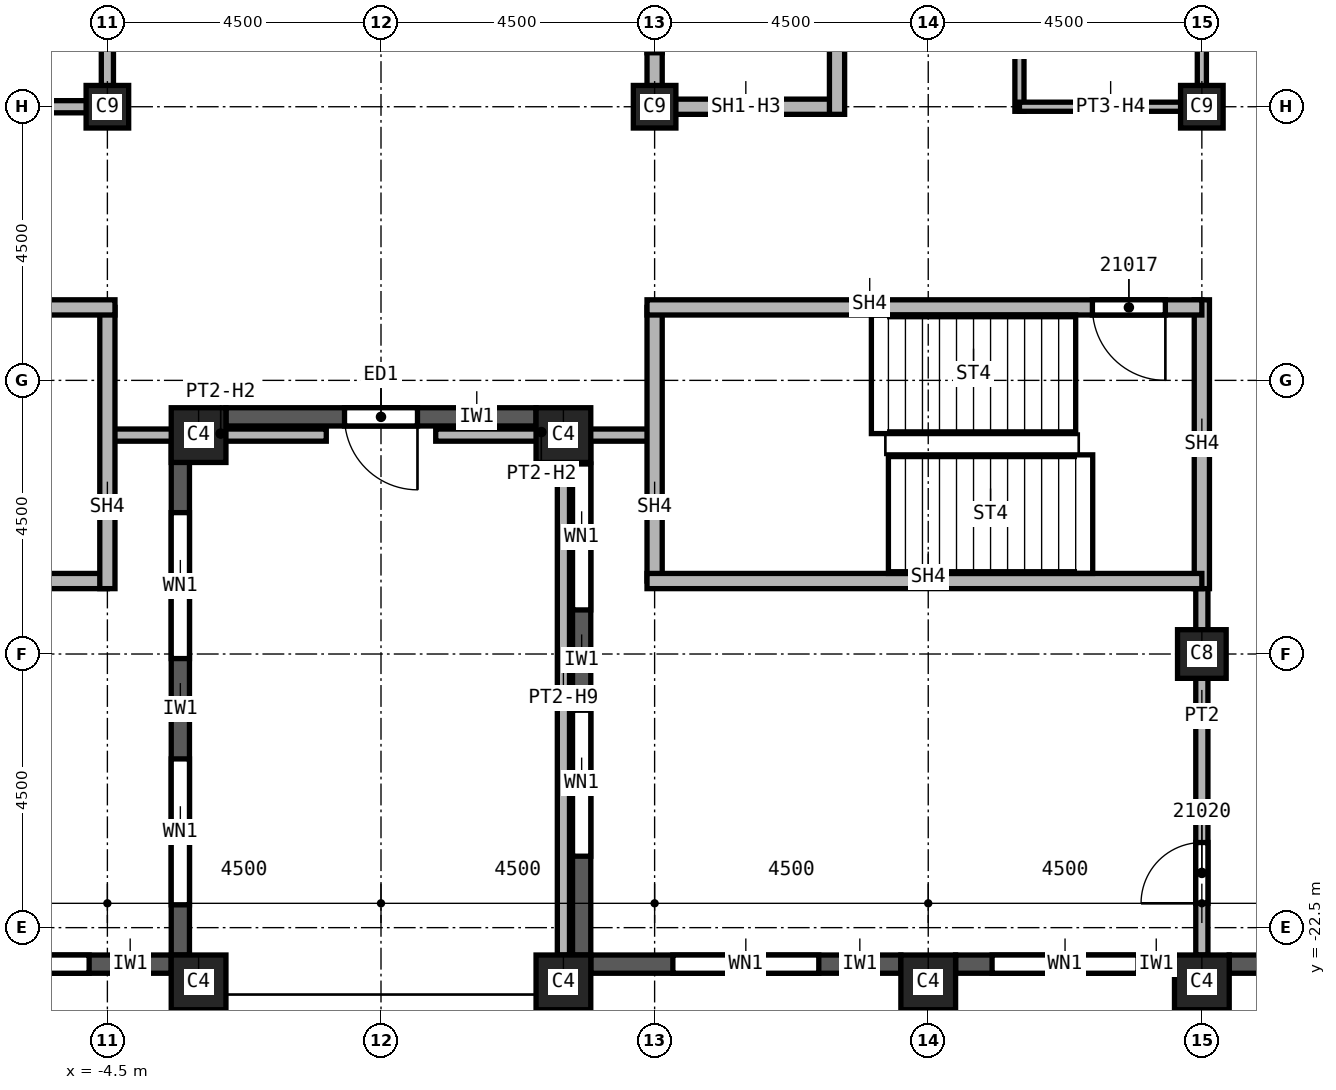
"""IFC4 building model, lengths in metres.
Left out: names, types, materials, properties, quantities, classifications, styles, units other than length and angle.
Written with IfcOpenShell. Run it as: python <this file> out.ifc"""

import sys

from ifc_helpers import new_model, si_unit, direction, frame, frame_2d, origin, origin_2d, place, context, subcontext, project, spatial, rectangle, extrude, element, fill, save


model = new_model("IFC4")
c1 = context("Model", 3, precision=1e-05, world=origin(), true_north=direction((0.0, 1.0)))
c2 = subcontext(c1, "Body", "Model", "MODEL_VIEW")
j1 = project(units=[si_unit("LENGTHUNIT", "METRE"), si_unit("PLANEANGLEUNIT", "RADIAN")], contexts=[c1])
p1 = place(None, origin())
s1 = spatial("IfcSite", under=j1, at=p1, CompositionType="ELEMENT")
p2 = place(p1, origin())
s2 = spatial("IfcBuilding", under=s1, at=p2, CompositionType="ELEMENT")
p3 = place(p2, frame((0.0, 0.0, 300.0)))
s3 = spatial("IfcBuildingStorey", under=s2, at=p3, CompositionType="ELEMENT", Elevation=300.0)
p4 = place(p3, frame((13.5, -18.0, 0.0), z_axis=(0.0, 0.0, 1.0), x_axis=(1.0, 0.0, 0.0)))
e1 = element("IfcColumn", 1, at=p4, inside=s3, PredefinedType="COLUMN", context=c2, shape_type="SweptSolid", body=[
    extrude(rectangle(XDim=0.8, YDim=0.8, at=origin_2d()), origin(), (0.0, 0.0, 1.0), 3.74),
])
for number, where, z_axis, x_axis in (
    (2, (4.5, -9.0, 0.0), (0.0, 0.0, 1.0), (1.0, 0.0, 0.0)),
    (3, (13.5, -9.0, 0.0), (0.0, 0.0, 1.0), (1.0, 0.0, 0.0)),
    (4, (-4.5, -9.0, 0.0), (0.0, 0.0, 1.0), (1.0, 0.0, 0.0)),
):
    element("IfcColumn", number, at=place(p3, frame(where, z_axis=z_axis, x_axis=x_axis)), inside=s3, PredefinedType="COLUMN", context=c2, shape_type="SweptSolid", body=[
        extrude(rectangle(XDim=0.7, YDim=0.7, at=origin_2d()), origin(), (0.0, 0.0, 1.0), 3.74),
    ])
for number, where, z_axis, x_axis in (
    (5, (3.0, -23.4, 0.0), (0.0, 0.0, 1.0), (1.0, 0.0, 0.0)),
    (6, (9.0, -23.4, 0.0), (0.0, 0.0, 1.0), (1.0, 0.0, 0.0)),
    (7, (13.5, -23.4, 0.0), (0.0, 0.0, 1.0), (1.0, 0.0, 0.0)),
    (8, (-3.0, -23.4, 0.0), (0.0, 0.0, 1.0), (1.0, 0.0, 0.0)),
    (9, (3.0, -14.4, 0.0), (0.0, 0.0, 1.0), (1.0, 0.0, 0.0)),
    (10, (-3.0, -14.4, 0.0), (0.0, 0.0, 1.0), (1.0, 0.0, 0.0)),
):
    element("IfcColumn", number, at=place(p3, frame(where, z_axis=z_axis, x_axis=x_axis)), inside=s3, PredefinedType="COLUMN", context=c2, shape_type="SweptSolid", body=[
        extrude(rectangle(XDim=0.9, YDim=0.9, at=origin_2d()), origin(), (0.0, 0.0, 1.0), 3.74),
    ])
p5 = place(p3, frame((-8.55, -23.1, 0.0), z_axis=(0.0, 0.0, 1.0), x_axis=(1.0, 0.0, 0.0)))
e11 = element("IfcWall", 11, at=p5, inside=s3, PredefinedType="SOLIDWALL", context=c2, shape_type="SweptSolid", body=[
    extrude(rectangle(XDim=5.1, YDim=0.3, at=frame_2d((2.55, 0.0))), origin(), (0.0, 0.0, 1.0), 3.14),
])
p6 = place(p5, frame((1.35, 0.0, 0.8)))
e12 = element("IfcOpeningElement", 12, at=p6, cuts=e11, PredefinedType="OPENING", context=c2, shape_type="SweptSolid", body=[
    extrude(rectangle(XDim=2.4, YDim=1.95, at=frame_2d((1.2, 0.975))), frame((0.0, 0.15, 0.0), z_axis=(0.0, -1.0, 0.0), x_axis=(1.0, 0.0, 0.0)), (0.0, 0.0, 1.0), 0.3),
])
p7 = place(p3, frame((-3.3, -22.95, 0.0), z_axis=(0.0, 0.0, 1.0), x_axis=(0.0, 1.0, 0.0)))
e13 = element("IfcWall", 13, at=p7, inside=s3, PredefinedType="SOLIDWALL", context=c2, shape_type="SweptSolid", body=[
    extrude(rectangle(XDim=8.5, YDim=0.3, at=frame_2d((4.25, 0.0))), origin(), (0.0, 0.0, 1.0), 3.14),
])
p8 = place(p7, frame((0.825, 0.0, 0.8)))
e14 = element("IfcOpeningElement", 14, at=p8, cuts=e13, PredefinedType="OPENING", context=c2, shape_type="SweptSolid", body=[
    extrude(rectangle(XDim=2.4, YDim=1.95, at=frame_2d((1.2, 0.975))), frame((0.0, 0.15, 0.0), z_axis=(0.0, -1.0, 0.0), x_axis=(1.0, 0.0, 0.0)), (0.0, 0.0, 1.0), 0.3),
])
p9 = place(p7, frame((4.875, 0.0, 0.8)))
e15 = element("IfcOpeningElement", 15, at=p9, cuts=e13, PredefinedType="OPENING", context=c2, shape_type="SweptSolid", body=[
    extrude(rectangle(XDim=2.4, YDim=1.95, at=frame_2d((1.2, 0.975))), frame((0.0, 0.15, 0.0), z_axis=(0.0, -1.0, 0.0), x_axis=(1.0, 0.0, 0.0)), (0.0, 0.0, 1.0), 0.3),
])
p10 = place(p3, frame((2.55, -14.1, 0.0), z_axis=(0.0, 0.0, 1.0), x_axis=(-1.0, 0.0, 0.0)))
e16 = element("IfcWall", 16, at=p10, inside=s3, PredefinedType="SOLIDWALL", context=c2, shape_type="SweptSolid", body=[
    extrude(rectangle(XDim=5.1, YDim=0.3, at=frame_2d((2.55, 0.0))), origin(), (0.0, 0.0, 1.0), 3.14),
])
p11 = place(p10, frame((1.95, 0.0, 0.0)))
e17 = element("IfcOpeningElement", 17, at=p11, cuts=e16, PredefinedType="OPENING", context=c2, shape_type="SweptSolid", body=[
    extrude(rectangle(XDim=1.2, YDim=2.4, at=frame_2d((0.6, 1.2))), frame((0.0, 0.15, 0.0), z_axis=(0.0, -1.0, 0.0), x_axis=(1.0, 0.0, 0.0)), (0.0, 0.0, 1.0), 0.3),
])
p12 = place(p3, frame((3.3, -14.45, 0.0), z_axis=(0.0, 0.0, 1.0), x_axis=(0.0, -1.0, 0.0)))
e18 = element("IfcWall", 18, at=p12, inside=s3, PredefinedType="SOLIDWALL", context=c2, shape_type="SweptSolid", body=[
    extrude(rectangle(XDim=8.5, YDim=0.3, at=frame_2d((4.25, 0.0))), origin(), (0.0, 0.0, 1.0), 3.14),
])
p13 = place(p12, frame((0.425, 0.0, 0.8)))
e19 = element("IfcOpeningElement", 19, at=p13, cuts=e18, PredefinedType="OPENING", context=c2, shape_type="SweptSolid", body=[
    extrude(rectangle(XDim=2.4, YDim=1.95, at=frame_2d((1.2, 0.975))), frame((0.0, 0.15, 0.0), z_axis=(0.0, -1.0, 0.0), x_axis=(1.0, 0.0, 0.0)), (0.0, 0.0, 1.0), 0.3),
])
p14 = place(p12, frame((4.475, 0.0, 0.8)))
e20 = element("IfcOpeningElement", 20, at=p14, cuts=e18, PredefinedType="OPENING", context=c2, shape_type="SweptSolid", body=[
    extrude(rectangle(XDim=2.4, YDim=1.95, at=frame_2d((1.2, 0.975))), frame((0.0, 0.15, 0.0), z_axis=(0.0, -1.0, 0.0), x_axis=(1.0, 0.0, 0.0)), (0.0, 0.0, 1.0), 0.3),
])
p15 = place(p3, frame((3.45, -23.1, 0.0), z_axis=(0.0, 0.0, 1.0), x_axis=(1.0, 0.0, 0.0)))
e21 = element("IfcWall", 21, at=p15, inside=s3, PredefinedType="SOLIDWALL", context=c2, shape_type="SweptSolid", body=[
    extrude(rectangle(XDim=5.1, YDim=0.3, at=frame_2d((2.55, 0.0))), origin(), (0.0, 0.0, 1.0), 3.14),
])
p16 = place(p15, frame((1.35, 0.0, 0.8)))
e22 = element("IfcOpeningElement", 22, at=p16, cuts=e21, PredefinedType="OPENING", context=c2, shape_type="SweptSolid", body=[
    extrude(rectangle(XDim=2.4, YDim=1.95, at=frame_2d((1.2, 0.975))), frame((0.0, 0.15, 0.0), z_axis=(0.0, -1.0, 0.0), x_axis=(1.0, 0.0, 0.0)), (0.0, 0.0, 1.0), 0.3),
])
p17 = place(p3, frame((9.45, -23.1, 0.0), z_axis=(0.0, 0.0, 1.0), x_axis=(1.0, 0.0, 0.0)))
e23 = element("IfcWall", 23, at=p17, inside=s3, PredefinedType="SOLIDWALL", context=c2, shape_type="SweptSolid", body=[
    extrude(rectangle(XDim=3.6, YDim=0.3, at=frame_2d((1.8, 0.0))), origin(), (0.0, 0.0, 1.0), 3.14),
])
p18 = place(p17, frame((0.6, 0.0, 0.8)))
e24 = element("IfcOpeningElement", 24, at=p18, cuts=e23, PredefinedType="OPENING", context=c2, shape_type="SweptSolid", body=[
    extrude(rectangle(XDim=2.4, YDim=1.95, at=frame_2d((1.2, 0.975))), frame((0.0, 0.15, 0.0), z_axis=(0.0, -1.0, 0.0), x_axis=(1.0, 0.0, 0.0)), (0.0, 0.0, 1.0), 0.3),
])
p19 = place(p3, frame((13.95, -23.1, 0.0), z_axis=(0.0, 0.0, 1.0), x_axis=(1.0, 0.0, 0.0)))
e25 = element("IfcWall", 25, at=p19, inside=s3, PredefinedType="SOLIDWALL", context=c2, shape_type="SweptSolid", body=[
    extrude(rectangle(XDim=3.6, YDim=0.3, at=frame_2d((1.8, 0.0))), origin(), (0.0, 0.0, 1.0), 3.14),
])
p20 = place(p19, frame((0.625, 0.0, 0.8)))
e26 = element("IfcOpeningElement", 26, at=p20, cuts=e25, PredefinedType="OPENING", context=c2, shape_type="SweptSolid", body=[
    extrude(rectangle(XDim=0.6, YDim=1.95, at=frame_2d((0.3, 0.975))), frame((0.0, 0.15, 0.0), z_axis=(0.0, -1.0, 0.0), x_axis=(1.0, 0.0, 0.0)), (0.0, 0.0, 1.0), 0.3),
])
p21 = place(p19, frame((1.825, 0.0, 0.8)))
e27 = element("IfcOpeningElement", 27, at=p21, cuts=e25, PredefinedType="OPENING", context=c2, shape_type="SweptSolid", body=[
    extrude(rectangle(XDim=1.0, YDim=1.95, at=frame_2d((0.5, 0.975))), frame((0.0, 0.15, 0.0), z_axis=(0.0, -1.0, 0.0), x_axis=(1.0, 0.0, 0.0)), (0.0, 0.0, 1.0), 0.3),
])
p22 = place(p3, frame((-0.9, -14.4, 0.0), z_axis=(0.0, 0.0, 1.0), x_axis=(-1.0, 0.0, 0.0)))
e28 = element("IfcWall", 28, at=p22, inside=s3, PredefinedType="PARTITIONING", context=c2, shape_type="SweptSolid", body=[
    extrude(rectangle(XDim=3.6, YDim=0.2, at=frame_2d((1.8, 0.0))), origin(), (0.0, 0.0, 1.0), 3.207),
])
p23 = place(p3, frame((3.0, -14.4, 0.0), z_axis=(0.0, 0.0, 1.0), x_axis=(0.0, -1.0, 0.0)))
e29 = element("IfcWall", 29, at=p23, inside=s3, PredefinedType="PARTITIONING", context=c2, shape_type="SweptSolid", body=[
    extrude(rectangle(XDim=8.55, YDim=0.2, at=frame_2d((4.275, 0.0))), origin(), (0.0, 0.0, 1.0), 2.894),
])
p24 = place(p3, frame((4.5, -14.4, 0.0), z_axis=(0.0, 0.0, 1.0), x_axis=(-1.0, 0.0, 0.0)))
e30 = element("IfcWall", 30, at=p24, inside=s3, PredefinedType="PARTITIONING", context=c2, shape_type="SweptSolid", body=[
    extrude(rectangle(XDim=3.6, YDim=0.2, at=frame_2d((1.8, 0.0))), origin(), (0.0, 0.0, 1.0), 3.207),
])
p25 = place(p3, frame((13.5, -22.95, 0.0), z_axis=(0.0, 0.0, 1.0), x_axis=(0.0, 1.0, 0.0)))
e31 = element("IfcWall", 31, at=p25, inside=s3, PredefinedType="PARTITIONING", context=c2, shape_type="SweptSolid", body=[
    extrude(rectangle(XDim=6.275, YDim=0.2, at=frame_2d((3.137, 0.0))), origin(), (0.0, 0.0, 1.0), 3.74),
])
p26 = place(p25, frame((0.85, 0.0, 0.0)))
e32 = element("IfcOpeningElement", 32, at=p26, cuts=e31, PredefinedType="OPENING", context=c2, shape_type="SweptSolid", body=[
    extrude(rectangle(XDim=1.0, YDim=2.1, at=frame_2d((0.5, 1.05))), frame((0.0, 0.1, 0.0), z_axis=(0.0, -1.0, 0.0), x_axis=(1.0, 0.0, 0.0)), (0.0, 0.0, 1.0), 0.2),
])
p27 = place(p3, frame((-4.5, -9.0, 0.0), z_axis=(0.0, 0.0, 1.0), x_axis=(-1.0, 0.0, 0.0)))
e33 = element("IfcWall", 33, at=p27, inside=s3, PredefinedType="SOLIDWALL", context=c2, shape_type="SweptSolid", body=[
    extrude(rectangle(XDim=3.0, YDim=0.2, at=frame_2d((1.5, 0.0))), origin(), (0.0, 0.0, 1.0), 3.062),
])
p28 = place(p3, frame((-4.5, 6.0, 0.0), z_axis=(0.0, 0.0, 1.0), x_axis=(0.0, -1.0, 0.0)))
e34 = element("IfcWall", 34, at=p28, inside=s3, PredefinedType="SOLIDWALL", context=c2, shape_type="SweptSolid", body=[
    extrude(rectangle(XDim=15.1, YDim=0.2, at=frame_2d((7.55, 0.0))), origin(), (0.0, 0.0, 1.0), 3.062),
])
p29 = place(p28, frame((6.85, 0.0, 0.0)))
e35 = element("IfcOpeningElement", 35, at=p29, cuts=e34, PredefinedType="OPENING", context=c2, shape_type="SweptSolid", body=[
    extrude(rectangle(XDim=1.1, YDim=2.1, at=frame_2d((0.55, 1.05))), frame((0.0, 0.1, 0.0), z_axis=(0.0, -1.0, 0.0), x_axis=(1.0, 0.0, 0.0)), (0.0, 0.0, 1.0), 0.2),
])
p30 = place(p28, frame((1.6, 0.0, 0.0)))
e36 = element("IfcOpeningElement", 36, at=p30, cuts=e34, PredefinedType="OPENING", context=c2, shape_type="SweptSolid", body=[
    extrude(rectangle(XDim=1.1, YDim=2.1, at=frame_2d((0.55, 1.05))), frame((0.0, 0.1, 0.0), z_axis=(0.0, -1.0, 0.0), x_axis=(1.0, 0.0, 0.0)), (0.0, 0.0, 1.0), 0.2),
])
p31 = place(p3, frame((4.5, -9.125, 0.0), z_axis=(0.0, 0.0, 1.0), x_axis=(0.0, 1.0, 0.0)))
e37 = element("IfcWall", 37, at=p31, inside=s3, PredefinedType="SOLIDWALL", context=c2, shape_type="SweptSolid", body=[
    extrude(rectangle(XDim=3.125, YDim=0.25, at=frame_2d((1.562, 0.0))), origin(), (0.0, 0.0, 1.0), 3.062),
])
p32 = place(p31, frame((1.012, 0.0, 0.0)))
e38 = element("IfcOpeningElement", 38, at=p32, cuts=e37, PredefinedType="OPENING", context=c2, shape_type="SweptSolid", body=[
    extrude(rectangle(XDim=1.1, YDim=2.1, at=frame_2d((0.55, 1.05))), frame((0.0, 0.125, 0.0), z_axis=(0.0, -1.0, 0.0), x_axis=(1.0, 0.0, 0.0)), (0.0, 0.0, 1.0), 0.25),
])
p33 = place(p3, frame((7.5, -9.0, 0.0), z_axis=(0.0, 0.0, 1.0), x_axis=(-1.0, 0.0, 0.0)))
e39 = element("IfcWall", 39, at=p33, inside=s3, PredefinedType="SOLIDWALL", context=c2, shape_type="SweptSolid", body=[
    extrude(rectangle(XDim=3.0, YDim=0.25, at=frame_2d((1.5, 0.0))), origin(), (0.0, 0.0, 1.0), 3.062),
])
p34 = place(p3, frame((7.5, -6.0, 0.0), z_axis=(0.0, 0.0, 1.0), x_axis=(0.0, -1.0, 0.0)))
e40 = element("IfcWall", 40, at=p34, inside=s3, PredefinedType="SOLIDWALL", context=c2, shape_type="SweptSolid", body=[
    extrude(rectangle(XDim=3.125, YDim=0.25, at=frame_2d((1.562, 0.0))), origin(), (0.0, 0.0, 1.0), 3.74),
])
p35 = place(p3, frame((-4.5, -16.8, 0.0), z_axis=(0.0, 0.0, 1.0), x_axis=(-1.0, 0.0, 0.0)))
e41 = element("IfcWall", 41, at=p35, inside=s3, PredefinedType="SOLIDWALL", context=c2, shape_type="SweptSolid", body=[
    extrude(rectangle(XDim=9.0, YDim=0.25, at=frame_2d((4.5, 0.0))), origin(), (0.0, 0.0, 1.0), 3.74),
])
p36 = place(p3, frame((-4.5, -12.3, 0.0), z_axis=(0.0, 0.0, 1.0), x_axis=(0.0, -1.0, 0.0)))
e42 = element("IfcWall", 42, at=p36, inside=s3, PredefinedType="SOLIDWALL", context=c2, shape_type="SweptSolid", body=[
    extrude(rectangle(XDim=4.625, YDim=0.25, at=frame_2d((2.312, 0.0))), origin(), (0.0, 0.0, 1.0), 3.74),
])
p37 = place(p3, frame((-4.375, -12.3, 0.0), z_axis=(0.0, 0.0, 1.0), x_axis=(-1.0, 0.0, 0.0)))
e43 = element("IfcWall", 43, at=p37, inside=s3, PredefinedType="SOLIDWALL", context=c2, shape_type="SweptSolid", body=[
    extrude(rectangle(XDim=9.125, YDim=0.25, at=frame_2d((4.562, 0.0))), origin(), (0.0, 0.0, 1.0), 3.74),
])
p38 = place(p37, frame((7.2, 0.0, 0.0)))
e44 = element("IfcOpeningElement", 44, at=p38, cuts=e43, PredefinedType="OPENING", context=c2, shape_type="SweptSolid", body=[
    extrude(rectangle(XDim=1.2, YDim=2.1, at=frame_2d((0.6, 1.05))), frame((0.0, 0.125, 0.0), z_axis=(0.0, -1.0, 0.0), x_axis=(1.0, 0.0, 0.0)), (0.0, 0.0, 1.0), 0.25),
])
p39 = place(p3, frame((4.5, -16.8, 0.0), z_axis=(0.0, 0.0, 1.0), x_axis=(0.0, 1.0, 0.0)))
e45 = element("IfcWall", 45, at=p39, inside=s3, PredefinedType="SOLIDWALL", context=c2, shape_type="SweptSolid", body=[
    extrude(rectangle(XDim=4.5, YDim=0.25, at=frame_2d((2.25, 0.0))), origin(), (0.0, 0.0, 1.0), 3.74),
])
p40 = place(p3, frame((13.5, -16.925, 0.0), z_axis=(0.0, 0.0, 1.0), x_axis=(0.0, 1.0, 0.0)))
e46 = element("IfcWall", 46, at=p40, inside=s3, PredefinedType="SOLIDWALL", context=c2, shape_type="SweptSolid", body=[
    extrude(rectangle(XDim=4.75, YDim=0.25, at=frame_2d((2.375, 0.0))), origin(), (0.0, 0.0, 1.0), 3.74),
])
p41 = place(p3, frame((13.5, -16.8, 0.0), z_axis=(0.0, 0.0, 1.0), x_axis=(-1.0, 0.0, 0.0)))
e47 = element("IfcWall", 47, at=p41, inside=s3, PredefinedType="SOLIDWALL", context=c2, shape_type="SweptSolid", body=[
    extrude(rectangle(XDim=9.125, YDim=0.25, at=frame_2d((4.562, 0.0))), origin(), (0.0, 0.0, 1.0), 3.74),
])
p42 = place(p3, frame((13.5, -12.3, 0.0), z_axis=(0.0, 0.0, 1.0), x_axis=(-1.0, 0.0, 0.0)))
e48 = element("IfcWall", 48, at=p42, inside=s3, PredefinedType="SOLIDWALL", context=c2, shape_type="SweptSolid", body=[
    extrude(rectangle(XDim=9.125, YDim=0.25, at=frame_2d((4.562, 0.0))), origin(), (0.0, 0.0, 1.0), 3.74),
])
p43 = place(p42, frame((0.6, 0.0, 0.0)))
e49 = element("IfcOpeningElement", 49, at=p43, cuts=e48, PredefinedType="OPENING", context=c2, shape_type="SweptSolid", body=[
    extrude(rectangle(XDim=1.2, YDim=2.1, at=frame_2d((0.6, 1.05))), frame((0.0, 0.125, 0.0), z_axis=(0.0, -1.0, 0.0), x_axis=(1.0, 0.0, 0.0)), (0.0, 0.0, 1.0), 0.25),
])
p44 = place(p3, frame((10.5, -5.925, 0.0), z_axis=(0.0, 0.0, 1.0), x_axis=(0.0, -1.0, 0.0)))
e50 = element("IfcWall", 50, at=p44, inside=s3, PredefinedType="PARTITIONING", context=c2, shape_type="SweptSolid", body=[
    extrude(rectangle(XDim=3.15, YDim=0.15, at=frame_2d((1.575, 0.0))), origin(), (0.0, 0.0, 1.0), 3.74),
])
p45 = place(p44, frame((0.25, 0.0, 0.0)))
e51 = element("IfcOpeningElement", 51, at=p45, cuts=e50, PredefinedType="OPENING", context=c2, shape_type="SweptSolid", body=[
    extrude(rectangle(XDim=0.9, YDim=2.1, at=frame_2d((0.45, 1.05))), frame((0.0, 0.075, 0.0), z_axis=(0.0, -1.0, 0.0), x_axis=(1.0, 0.0, 0.0)), (0.0, 0.0, 1.0), 0.15),
])
p46 = place(p3, frame((13.5, -9.0, 0.0), z_axis=(0.0, 0.0, 1.0), x_axis=(-1.0, 0.0, 0.0)))
e52 = element("IfcWall", 52, at=p46, inside=s3, PredefinedType="PARTITIONING", context=c2, shape_type="SweptSolid", body=[
    extrude(rectangle(XDim=3.0, YDim=0.15, at=frame_2d((1.5, 0.0))), origin(), (0.0, 0.0, 1.0), 3.062),
])
p47 = place(p3, frame((13.5, -6.0, 0.0), z_axis=(0.0, 0.0, 1.0), x_axis=(0.0, -1.0, 0.0)))
e53 = element("IfcWall", 53, at=p47, inside=s3, PredefinedType="PARTITIONING", context=c2, shape_type="SweptSolid", body=[
    extrude(rectangle(XDim=3.075, YDim=0.15, at=frame_2d((1.538, 0.0))), origin(), (0.0, 0.0, 1.0), 3.062),
])
p48 = place(p6, origin())
e54 = element("IfcWindow", 54, at=p48, inside=s3, PartitioningType="SINGLE_PANEL", PredefinedType="WINDOW", context=c2, shape_type="SweptSolid", body=[
    extrude(rectangle(XDim=2.4, YDim=1.95, at=frame_2d((1.2, 0.975))), frame((0.0, 0.03, 0.0), z_axis=(0.0, -1.0, 0.0), x_axis=(1.0, 0.0, 0.0)), (0.0, 0.0, 1.0), 0.06),
])
fill(e12, e54)
p49 = place(p8, origin())
e55 = element("IfcWindow", 55, at=p49, inside=s3, PartitioningType="SINGLE_PANEL", PredefinedType="WINDOW", context=c2, shape_type="SweptSolid", body=[
    extrude(rectangle(XDim=2.4, YDim=1.95, at=frame_2d((1.2, 0.975))), frame((0.0, 0.03, 0.0), z_axis=(0.0, -1.0, 0.0), x_axis=(1.0, 0.0, 0.0)), (0.0, 0.0, 1.0), 0.06),
])
fill(e14, e55)
p50 = place(p9, origin())
e56 = element("IfcWindow", 56, at=p50, inside=s3, PartitioningType="SINGLE_PANEL", PredefinedType="WINDOW", context=c2, shape_type="SweptSolid", body=[
    extrude(rectangle(XDim=2.4, YDim=1.95, at=frame_2d((1.2, 0.975))), frame((0.0, 0.03, 0.0), z_axis=(0.0, -1.0, 0.0), x_axis=(1.0, 0.0, 0.0)), (0.0, 0.0, 1.0), 0.06),
])
fill(e15, e56)
p51 = place(p11, origin())
e57 = element("IfcDoor", 57, at=p51, inside=s3, OperationType="SINGLE_SWING_LEFT", PredefinedType="DOOR", context=c2, shape_type="SweptSolid", body=[
    extrude(rectangle(XDim=1.2, YDim=2.4, at=frame_2d((0.6, 1.2))), frame((0.0, 0.025, 0.0), z_axis=(0.0, -1.0, 0.0), x_axis=(1.0, 0.0, 0.0)), (0.0, 0.0, 1.0), 0.05),
])
fill(e17, e57)
p52 = place(p13, origin())
e58 = element("IfcWindow", 58, at=p52, inside=s3, PartitioningType="SINGLE_PANEL", PredefinedType="WINDOW", context=c2, shape_type="SweptSolid", body=[
    extrude(rectangle(XDim=2.4, YDim=1.95, at=frame_2d((1.2, 0.975))), frame((0.0, 0.03, 0.0), z_axis=(0.0, -1.0, 0.0), x_axis=(1.0, 0.0, 0.0)), (0.0, 0.0, 1.0), 0.06),
])
fill(e19, e58)
p53 = place(p14, origin())
e59 = element("IfcWindow", 59, at=p53, inside=s3, PartitioningType="SINGLE_PANEL", PredefinedType="WINDOW", context=c2, shape_type="SweptSolid", body=[
    extrude(rectangle(XDim=2.4, YDim=1.95, at=frame_2d((1.2, 0.975))), frame((0.0, 0.03, 0.0), z_axis=(0.0, -1.0, 0.0), x_axis=(1.0, 0.0, 0.0)), (0.0, 0.0, 1.0), 0.06),
])
fill(e20, e59)
p54 = place(p16, origin())
e60 = element("IfcWindow", 60, at=p54, inside=s3, PartitioningType="SINGLE_PANEL", PredefinedType="WINDOW", context=c2, shape_type="SweptSolid", body=[
    extrude(rectangle(XDim=2.4, YDim=1.95, at=frame_2d((1.2, 0.975))), frame((0.0, 0.03, 0.0), z_axis=(0.0, -1.0, 0.0), x_axis=(1.0, 0.0, 0.0)), (0.0, 0.0, 1.0), 0.06),
])
fill(e22, e60)
p55 = place(p18, origin())
e61 = element("IfcWindow", 61, at=p55, inside=s3, PartitioningType="SINGLE_PANEL", PredefinedType="WINDOW", context=c2, shape_type="SweptSolid", body=[
    extrude(rectangle(XDim=2.4, YDim=1.95, at=frame_2d((1.2, 0.975))), frame((0.0, 0.03, 0.0), z_axis=(0.0, -1.0, 0.0), x_axis=(1.0, 0.0, 0.0)), (0.0, 0.0, 1.0), 0.06),
])
fill(e24, e61)
p56 = place(p43, origin())
e62 = element("IfcDoor", 62, at=p56, inside=s3, OperationType="SINGLE_SWING_RIGHT", PredefinedType="DOOR", context=c2, shape_type="SweptSolid", body=[
    extrude(rectangle(XDim=1.2, YDim=2.1, at=frame_2d((0.6, 1.05))), frame((0.0, 0.025, 0.0), z_axis=(0.0, -1.0, 0.0), x_axis=(1.0, 0.0, 0.0)), (0.0, 0.0, 1.0), 0.05),
])
fill(e49, e62)
p57 = place(p26, origin())
e63 = element("IfcDoor", 63, at=p57, inside=s3, OperationType="SINGLE_SWING_LEFT", PredefinedType="DOOR", context=c2, shape_type="SweptSolid", body=[
    extrude(rectangle(XDim=1.0, YDim=2.1, at=frame_2d((0.5, 1.05))), frame((0.0, 0.025, 0.0), z_axis=(0.0, -1.0, 0.0), x_axis=(1.0, 0.0, 0.0)), (0.0, 0.0, 1.0), 0.05),
])
fill(e32, e63)
p58 = place(p32, origin())
e64 = element("IfcDoor", 64, at=p58, inside=s3, OperationType="SLIDING_TO_LEFT", PredefinedType="DOOR", context=c2, shape_type="SweptSolid", body=[
    extrude(rectangle(XDim=1.1, YDim=2.1, at=frame_2d((0.55, 1.05))), frame((0.0, 0.025, 0.0), z_axis=(0.0, -1.0, 0.0), x_axis=(1.0, 0.0, 0.0)), (0.0, 0.0, 1.0), 0.05),
])
fill(e38, e64)
save(model, sys.argv[1])
